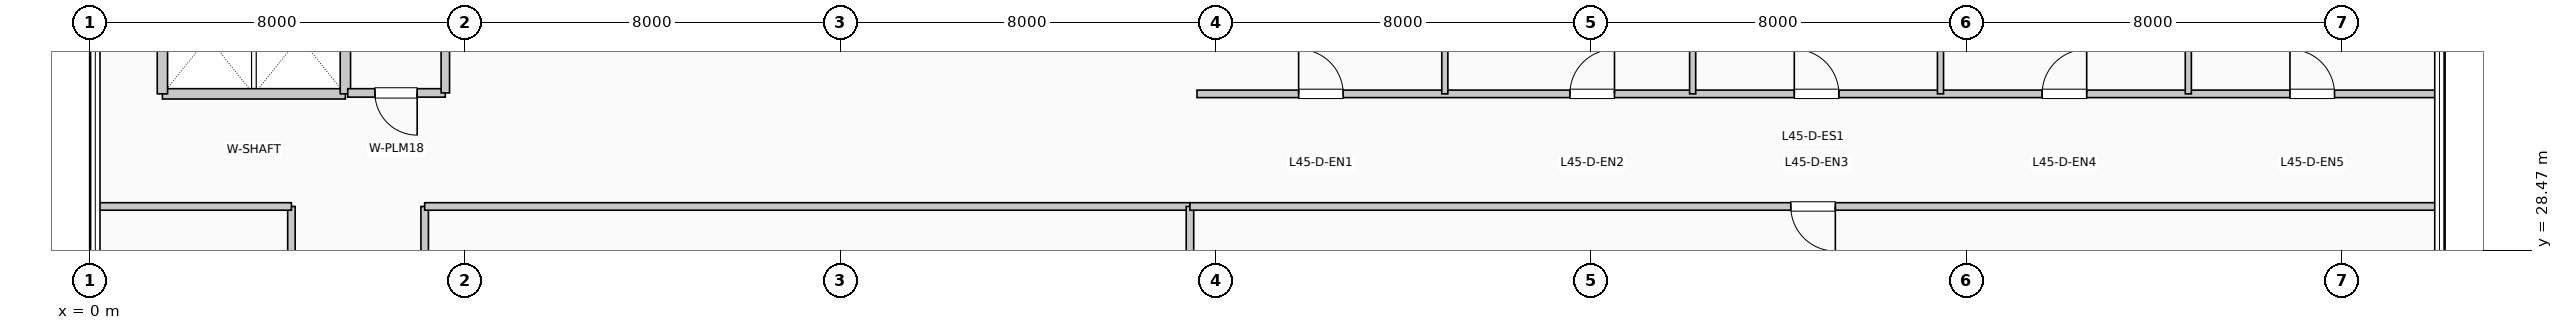
"""IFC4 building model, lengths in metres.
Left out: names, types, materials, properties, quantities, classifications, styles, units other than length and angle.
Written with IfcOpenShell. Run it as: python <this file> out.ifc"""

import sys

from ifc_helpers import new_model, si_unit, direction, frame, frame_2d, origin, place, context, subcontext, project, spatial, rectangle, extrude, element, fill, save


model = new_model("IFC4")
c1 = context("Model", 3, precision=1e-05, world=origin(), true_north=direction((0.0, 1.0)))
c2 = subcontext(c1, "Body", "Model", "MODEL_VIEW")
j1 = project(units=[si_unit("LENGTHUNIT", "METRE"), si_unit("PLANEANGLEUNIT", "RADIAN")], contexts=[c1])
p1 = place(None, origin())
s1 = spatial("IfcSite", under=j1, at=p1, CompositionType="ELEMENT")
p2 = place(p1, origin())
s2 = spatial("IfcBuilding", under=s1, at=p2, CompositionType="ELEMENT")
p3 = place(p2, frame((0.0, 0.0, 187.44)))
s3 = spatial("IfcBuildingStorey", under=s2, at=p3, CompositionType="ELEMENT", Elevation=187.44)
p4 = place(p3, frame((1.55, 31.8, 0.0), z_axis=(0.0, 0.0, 1.0), x_axis=(1.0, 0.0, 0.0)))
e1 = element("IfcWall", 1, at=p4, inside=s3, PredefinedType="PARTITIONING", context=c2, shape_type="SweptSolid", body=[
    extrude(rectangle(XDim=3.9, YDim=0.22, at=frame_2d((1.95, 0.0))), origin(), (0.0, 0.0, 1.0), 3.71),
])
for number, where, z_axis, x_axis in (
    (2, (1.55, 31.8, 0.0), (0.0, 0.0, 1.0), (0.0, 1.0, 0.0)),
    (3, (5.45, 31.8, 0.0), (0.0, 0.0, 1.0), (0.0, 1.0, 0.0)),
):
    element("IfcWall", number, at=place(p3, frame(where, z_axis=z_axis, x_axis=x_axis)), inside=s3, PredefinedType="PARTITIONING", context=c2, shape_type="SweptSolid", body=[
        extrude(rectangle(XDim=2.38, YDim=0.22, at=frame_2d((1.19, 0.0))), origin(), (0.0, 0.0, 1.0), 3.71),
    ])
p5 = place(p3, frame((5.5, 31.82, 0.0), z_axis=(0.0, 0.0, 1.0), x_axis=(1.0, 0.0, 0.0)))
e4 = element("IfcWall", 4, at=p5, inside=s3, PredefinedType="PLUMBINGWALL", context=c2, shape_type="SweptSolid", body=[
    extrude(rectangle(XDim=2.08, YDim=0.18, at=frame_2d((1.04, 0.0))), origin(), (0.0, 0.0, 1.0), 3.71),
])
p6 = place(p5, frame((1.48, 0.0, 0.0), z_axis=(0.0, 0.0, 1.0), x_axis=(-1.0, 0.0, 0.0)))
e5 = element("IfcOpeningElement", 5, at=p6, cuts=e4, PredefinedType="OPENING", context=c2, shape_type="SweptSolid", body=[
    extrude(rectangle(XDim=0.9, YDim=2.1, at=frame_2d((0.45, 1.05))), frame((0.0, 0.1, 0.0), z_axis=(0.0, -1.0, 0.0), x_axis=(1.0, 0.0, 0.0)), (0.0, 0.0, 1.0), 0.2),
])
p7 = place(p3, frame((7.58, 31.82, 0.0), z_axis=(0.0, 0.0, 1.0), x_axis=(0.0, 1.0, 0.0)))
e6 = element("IfcWall", 6, at=p7, inside=s3, PredefinedType="PLUMBINGWALL", context=c2, shape_type="SweptSolid", body=[
    extrude(rectangle(XDim=2.36, YDim=0.18, at=frame_2d((1.18, 0.0))), origin(), (0.0, 0.0, 1.0), 3.71),
])
p8 = place(p3, frame((4.3, 13.8, 0.0), z_axis=(0.0, 0.0, 1.0), x_axis=(0.0, 1.0, 0.0)))
e7 = element("IfcWall", 7, at=p8, inside=s3, PredefinedType="PARTITIONING", context=c2, shape_type="SweptSolid", body=[
    extrude(rectangle(XDim=15.6, YDim=0.16, at=frame_2d((7.8, 0.0))), origin(), (0.0, 0.0, 1.0), 3.71),
])
p9 = place(p8, frame((8.275, 0.0, 0.0), z_axis=(0.0, 0.0, 1.0), x_axis=(-1.0, 0.0, 0.0)))
e8 = element("IfcOpeningElement", 8, at=p9, cuts=e7, PredefinedType="OPENING", context=c2, shape_type="SweptSolid", body=[
    extrude(rectangle(XDim=0.95, YDim=2.15, at=frame_2d((0.475, 1.075))), frame((0.0, 0.09, 0.0), z_axis=(0.0, -1.0, 0.0), x_axis=(1.0, 0.0, 0.0)), (0.0, 0.0, 1.0), 0.18),
])
p10 = place(p3, frame((7.14, 13.8, 0.0), z_axis=(0.0, 0.0, 1.0), x_axis=(0.0, 1.0, 0.0)))
e9 = element("IfcWall", 9, at=p10, inside=s3, PredefinedType="PARTITIONING", context=c2, shape_type="SweptSolid", body=[
    extrude(rectangle(XDim=15.6, YDim=0.16, at=frame_2d((7.8, 0.0))), origin(), (0.0, 0.0, 1.0), 3.71),
])
p11 = place(p10, frame((2.177, 0.0, 0.0)))
e10 = element("IfcOpeningElement", 10, at=p11, cuts=e9, PredefinedType="OPENING", context=c2, shape_type="SweptSolid", body=[
    extrude(rectangle(XDim=0.95, YDim=2.15, at=frame_2d((0.475, 1.075))), frame((0.0, 0.09, 0.0), z_axis=(0.0, -1.0, 0.0), x_axis=(1.0, 0.0, 0.0)), (0.0, 0.0, 1.0), 0.18),
])
p12 = place(p10, frame((7.481, 0.0, 0.0)))
e11 = element("IfcOpeningElement", 11, at=p12, cuts=e9, PredefinedType="OPENING", context=c2, shape_type="SweptSolid", body=[
    extrude(rectangle(XDim=0.95, YDim=2.15, at=frame_2d((0.475, 1.075))), frame((0.0, 0.09, 0.0), z_axis=(0.0, -1.0, 0.0), x_axis=(1.0, 0.0, 0.0)), (0.0, 0.0, 1.0), 0.18),
])
p13 = place(p10, frame((12.629, 0.0, 0.0)))
e12 = element("IfcOpeningElement", 12, at=p13, cuts=e9, PredefinedType="OPENING", context=c2, shape_type="SweptSolid", body=[
    extrude(rectangle(XDim=0.95, YDim=2.15, at=frame_2d((0.475, 1.075))), frame((0.0, 0.09, 0.0), z_axis=(0.0, -1.0, 0.0), x_axis=(1.0, 0.0, 0.0)), (0.0, 0.0, 1.0), 0.18),
])
p14 = place(p3, frame((0.19, 29.4, 0.0), z_axis=(0.0, 0.0, 1.0), x_axis=(1.0, 0.0, 0.0)))
e13 = element("IfcWall", 13, at=p14, inside=s3, PredefinedType="PARTITIONING", context=c2, shape_type="SweptSolid", body=[
    extrude(rectangle(XDim=4.11, YDim=0.16, at=frame_2d((2.055, 0.0))), origin(), (0.0, 0.0, 1.0), 3.365),
])
p15 = place(p3, frame((7.14, 29.4, 0.0), z_axis=(0.0, 0.0, 1.0), x_axis=(1.0, 0.0, 0.0)))
e14 = element("IfcWall", 14, at=p15, inside=s3, PredefinedType="PARTITIONING", context=c2, shape_type="SweptSolid", body=[
    extrude(rectangle(XDim=16.31, YDim=0.16, at=frame_2d((8.155, 0.0))), origin(), (0.0, 0.0, 1.0), 3.365),
])
p16 = place(p3, frame((23.45, 0.19, 0.0), z_axis=(0.0, 0.0, 1.0), x_axis=(0.0, 1.0, 0.0)))
e15 = element("IfcWall", 15, at=p16, inside=s3, PredefinedType="PARTITIONING", context=c2, shape_type="SweptSolid", body=[
    extrude(rectangle(XDim=29.21, YDim=0.16, at=frame_2d((14.605, 0.0))), origin(), (0.0, 0.0, 1.0), 3.045),
])
p17 = place(p3, frame((23.45, 29.4, 0.0), z_axis=(0.0, 0.0, 1.0), x_axis=(1.0, 0.0, 0.0)))
e16 = element("IfcWall", 16, at=p17, inside=s3, PredefinedType="PARTITIONING", context=c2, shape_type="SweptSolid", body=[
    extrude(rectangle(XDim=26.56, YDim=0.16, at=frame_2d((13.28, 0.0))), origin(), (0.0, 0.0, 1.0), 3.365),
])
p18 = place(p17, frame((13.755, 0.0, 0.0), z_axis=(0.0, 0.0, 1.0), x_axis=(-1.0, 0.0, 0.0)))
e17 = element("IfcOpeningElement", 17, at=p18, cuts=e16, PredefinedType="OPENING", context=c2, shape_type="SweptSolid", body=[
    extrude(rectangle(XDim=0.95, YDim=2.15, at=frame_2d((0.475, 1.075))), frame((0.0, 0.09, 0.0), z_axis=(0.0, -1.0, 0.0), x_axis=(1.0, 0.0, 0.0)), (0.0, 0.0, 1.0), 0.18),
])
p19 = place(p3, frame((23.6, 31.8, 0.0), z_axis=(0.0, 0.0, 1.0), x_axis=(1.0, 0.0, 0.0)))
e18 = element("IfcWall", 18, at=p19, inside=s3, PredefinedType="PARTITIONING", context=c2, shape_type="SweptSolid", body=[
    extrude(rectangle(XDim=26.41, YDim=0.16, at=frame_2d((13.205, 0.0))), origin(), (0.0, 0.0, 1.0), 3.71),
])
p20 = place(p19, frame((2.166, 0.0, 0.0)))
e19 = element("IfcOpeningElement", 19, at=p20, cuts=e18, PredefinedType="OPENING", context=c2, shape_type="SweptSolid", body=[
    extrude(rectangle(XDim=0.95, YDim=2.15, at=frame_2d((0.475, 1.075))), frame((0.0, 0.09, 0.0), z_axis=(0.0, -1.0, 0.0), x_axis=(1.0, 0.0, 0.0)), (0.0, 0.0, 1.0), 0.18),
])
p21 = place(p19, frame((7.948, 0.0, 0.0)))
e20 = element("IfcOpeningElement", 20, at=p21, cuts=e18, PredefinedType="OPENING", context=c2, shape_type="SweptSolid", body=[
    extrude(rectangle(XDim=0.95, YDim=2.15, at=frame_2d((0.475, 1.075))), frame((0.0, 0.09, 0.0), z_axis=(0.0, -1.0, 0.0), x_axis=(1.0, 0.0, 0.0)), (0.0, 0.0, 1.0), 0.18),
])
p22 = place(p19, frame((12.73, 0.0, 0.0)))
e21 = element("IfcOpeningElement", 21, at=p22, cuts=e18, PredefinedType="OPENING", context=c2, shape_type="SweptSolid", body=[
    extrude(rectangle(XDim=0.95, YDim=2.15, at=frame_2d((0.475, 1.075))), frame((0.0, 0.09, 0.0), z_axis=(0.0, -1.0, 0.0), x_axis=(1.0, 0.0, 0.0)), (0.0, 0.0, 1.0), 0.18),
])
p23 = place(p19, frame((18.012, 0.0, 0.0)))
e22 = element("IfcOpeningElement", 22, at=p23, cuts=e18, PredefinedType="OPENING", context=c2, shape_type="SweptSolid", body=[
    extrude(rectangle(XDim=0.95, YDim=2.15, at=frame_2d((0.475, 1.075))), frame((0.0, 0.09, 0.0), z_axis=(0.0, -1.0, 0.0), x_axis=(1.0, 0.0, 0.0)), (0.0, 0.0, 1.0), 0.18),
])
p24 = place(p19, frame((23.294, 0.0, 0.0)))
e23 = element("IfcOpeningElement", 23, at=p24, cuts=e18, PredefinedType="OPENING", context=c2, shape_type="SweptSolid", body=[
    extrude(rectangle(XDim=0.95, YDim=2.15, at=frame_2d((0.475, 1.075))), frame((0.0, 0.09, 0.0), z_axis=(0.0, -1.0, 0.0), x_axis=(1.0, 0.0, 0.0)), (0.0, 0.0, 1.0), 0.18),
])
for number, where, z_axis, x_axis in (
    (24, (28.882, 31.8, 0.0), (0.0, 0.0, 1.0), (0.0, 1.0, 0.0)),
    (25, (34.164, 31.8, 0.0), (0.0, 0.0, 1.0), (0.0, 1.0, 0.0)),
    (26, (39.446, 31.8, 0.0), (0.0, 0.0, 1.0), (0.0, 1.0, 0.0)),
    (27, (44.728, 31.8, 0.0), (0.0, 0.0, 1.0), (0.0, 1.0, 0.0)),
):
    element("IfcWall", number, at=place(p3, frame(where, z_axis=z_axis, x_axis=x_axis)), inside=s3, PredefinedType="PARTITIONING", context=c2, shape_type="SweptSolid", body=[
        extrude(rectangle(XDim=14.01, YDim=0.13, at=frame_2d((7.005, 0.0))), origin(), (0.0, 0.0, 1.0), 3.71),
    ])
p25 = place(p6, origin())
e28 = element("IfcDoor", 28, at=p25, inside=s3, OperationType="SINGLE_SWING_RIGHT", PredefinedType="DOOR", context=c2, shape_type="SweptSolid", body=[
    extrude(rectangle(XDim=0.9, YDim=2.1, at=frame_2d((0.45, 1.05))), frame((0.0, 0.025, 0.0), z_axis=(0.0, -1.0, 0.0), x_axis=(1.0, 0.0, 0.0)), (0.0, 0.0, 1.0), 0.05),
])
fill(e5, e28)
p26 = place(p18, origin())
e29 = element("IfcDoor", 29, at=p26, inside=s3, OperationType="SINGLE_SWING_RIGHT", PredefinedType="DOOR", context=c2, shape_type="SweptSolid", body=[
    extrude(rectangle(XDim=0.95, YDim=2.15, at=frame_2d((0.475, 1.075))), frame((0.0, 0.025, 0.0), z_axis=(0.0, -1.0, 0.0), x_axis=(1.0, 0.0, 0.0)), (0.0, 0.0, 1.0), 0.05),
])
fill(e17, e29)
p27 = place(p20, origin())
e30 = element("IfcDoor", 30, at=p27, inside=s3, OperationType="SINGLE_SWING_LEFT", PredefinedType="DOOR", context=c2, shape_type="SweptSolid", body=[
    extrude(rectangle(XDim=0.95, YDim=2.15, at=frame_2d((0.475, 1.075))), frame((0.0, 0.025, 0.0), z_axis=(0.0, -1.0, 0.0), x_axis=(1.0, 0.0, 0.0)), (0.0, 0.0, 1.0), 0.05),
])
fill(e19, e30)
p28 = place(p21, origin())
e31 = element("IfcDoor", 31, at=p28, inside=s3, OperationType="SINGLE_SWING_RIGHT", PredefinedType="DOOR", context=c2, shape_type="SweptSolid", body=[
    extrude(rectangle(XDim=0.95, YDim=2.15, at=frame_2d((0.475, 1.075))), frame((0.0, 0.025, 0.0), z_axis=(0.0, -1.0, 0.0), x_axis=(1.0, 0.0, 0.0)), (0.0, 0.0, 1.0), 0.05),
])
fill(e20, e31)
p29 = place(p22, origin())
e32 = element("IfcDoor", 32, at=p29, inside=s3, OperationType="SINGLE_SWING_LEFT", PredefinedType="DOOR", context=c2, shape_type="SweptSolid", body=[
    extrude(rectangle(XDim=0.95, YDim=2.15, at=frame_2d((0.475, 1.075))), frame((0.0, 0.025, 0.0), z_axis=(0.0, -1.0, 0.0), x_axis=(1.0, 0.0, 0.0)), (0.0, 0.0, 1.0), 0.05),
])
fill(e21, e32)
p30 = place(p23, origin())
e33 = element("IfcDoor", 33, at=p30, inside=s3, OperationType="SINGLE_SWING_RIGHT", PredefinedType="DOOR", context=c2, shape_type="SweptSolid", body=[
    extrude(rectangle(XDim=0.95, YDim=2.15, at=frame_2d((0.475, 1.075))), frame((0.0, 0.025, 0.0), z_axis=(0.0, -1.0, 0.0), x_axis=(1.0, 0.0, 0.0)), (0.0, 0.0, 1.0), 0.05),
])
fill(e22, e33)
p31 = place(p24, origin())
e34 = element("IfcDoor", 34, at=p31, inside=s3, OperationType="SINGLE_SWING_LEFT", PredefinedType="DOOR", context=c2, shape_type="SweptSolid", body=[
    extrude(rectangle(XDim=0.95, YDim=2.15, at=frame_2d((0.475, 1.075))), frame((0.0, 0.025, 0.0), z_axis=(0.0, -1.0, 0.0), x_axis=(1.0, 0.0, 0.0)), (0.0, 0.0, 1.0), 0.05),
])
fill(e23, e34)
save(model, sys.argv[1])
